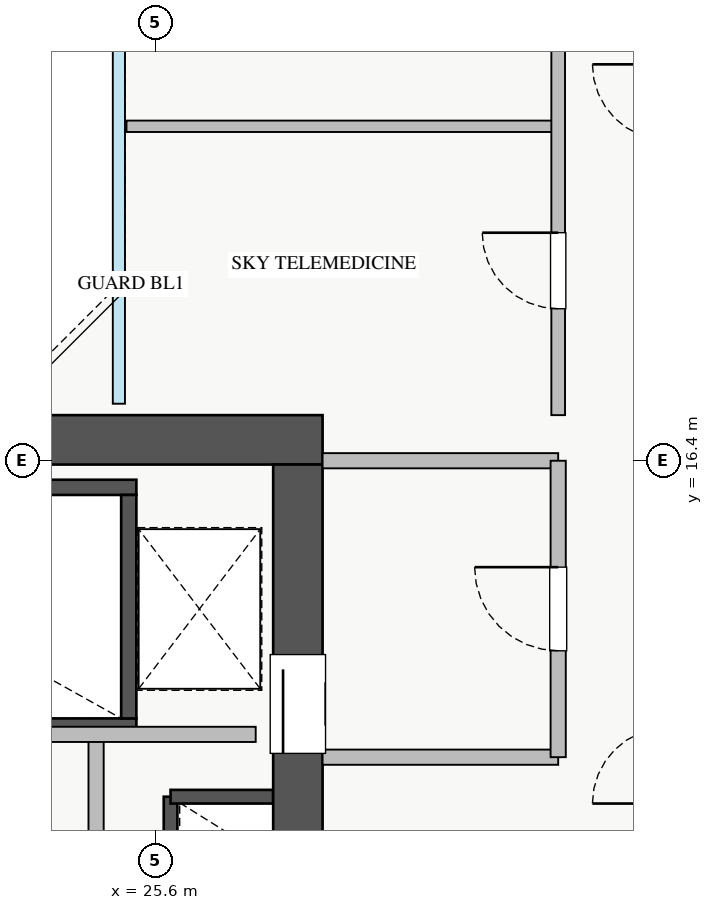
"""IFC4 building model, lengths in metres.
Left out: names, types, materials, properties, quantities, classifications, styles, units other than length and angle.
Written with IfcOpenShell. Run it as: python <this file> out.ifc"""

import sys

from ifc_helpers import new_model, si_unit, direction, frame, frame_2d, origin, place, context, subcontext, project, spatial, rectangle, extrude, source, transform, mapped, element, fill, save


model = new_model("IFC4")
c1 = context("Model", 3, precision=1e-05, world=origin(), true_north=direction((0.0, 1.0)))
c2 = subcontext(c1, "Body", "Model", "MODEL_VIEW")
j1 = project(units=[si_unit("LENGTHUNIT", "METRE"), si_unit("PLANEANGLEUNIT", "RADIAN")], contexts=[c1])
p1 = place(None, origin())
s1 = spatial("IfcSite", under=j1, at=p1, CompositionType="ELEMENT")
p2 = place(p1, origin())
s2 = spatial("IfcBuilding", under=s1, at=p2, CompositionType="ELEMENT")
p3 = place(p2, frame((0.0, 0.0, 182.75)))
s3 = spatial("IfcBuildingStorey", under=s2, at=p3, CompositionType="ELEMENT", Elevation=182.75)
p4 = place(p3, frame((25.8, 10.92, 0.0), z_axis=(0.0, 0.0, 1.0), x_axis=(0.0, 1.0, 0.0)))
e1 = element("IfcWall", 1, at=p4, inside=s3, PredefinedType="SHEAR", context=c2, shape_type="SweptSolid", body=[
    extrude(rectangle(XDim=1.06, YDim=0.18, at=frame_2d((0.53, 0.0))), origin(), (0.0, 0.0, 1.0), 3.03),
])
p5 = place(p3, frame((25.8, 11.98, 0.0), z_axis=(0.0, 0.0, 1.0), x_axis=(1.0, 0.0, 0.0)))
e2 = element("IfcWall", 2, at=p5, inside=s3, PredefinedType="SHEAR", context=c2, shape_type="SweptSolid", body=[
    extrude(rectangle(XDim=1.35, YDim=0.18, at=frame_2d((0.675, 0.0))), origin(), (0.0, 0.0, 1.0), 3.03),
])
p6 = place(p3, frame((18.2, 12.91, 0.0), z_axis=(0.0, 0.0, 1.0), x_axis=(1.0, 0.0, 0.0)))
e3 = element("IfcWall", 3, at=p6, inside=s3, PredefinedType="SHEAR", context=c2, shape_type="SweptSolid", body=[
    extrude(rectangle(XDim=7.15, YDim=0.2, at=frame_2d((3.575, 0.0))), origin(), (0.0, 0.0, 1.0), 3.25),
])
p7 = place(p6, frame((0.35, 0.0, 0.0)))
e4 = element("IfcOpeningElement", 4, at=p7, cuts=e3, PredefinedType="OPENING", context=c2, shape_type="SweptSolid", body=[
    extrude(rectangle(XDim=1.1, YDim=2.05, at=frame_2d((0.55, 1.025))), frame((0.0, 0.11, 0.0), z_axis=(0.0, -1.0, 0.0), x_axis=(1.0, 0.0, 0.0)), (0.0, 0.0, 1.0), 0.22),
])
p8 = place(p3, frame((18.2, 16.05, 0.0), z_axis=(0.0, 0.0, 1.0), x_axis=(1.0, 0.0, 0.0)))
e5 = element("IfcWall", 5, at=p8, inside=s3, PredefinedType="SHEAR", context=c2, shape_type="SweptSolid", body=[
    extrude(rectangle(XDim=7.15, YDim=0.2, at=frame_2d((3.575, 0.0))), origin(), (0.0, 0.0, 1.0), 3.25),
])
p9 = place(p3, frame((25.25, 13.01, 0.0), z_axis=(0.0, 0.0, 1.0), x_axis=(0.0, 1.0, 0.0)))
e6 = element("IfcWall", 6, at=p9, inside=s3, PredefinedType="SHEAR", context=c2, shape_type="SweptSolid", body=[
    extrude(rectangle(XDim=2.94, YDim=0.2, at=frame_2d((1.47, 0.0))), origin(), (0.0, 0.0, 1.0), 3.25),
])
p10 = place(p3, frame((10.2, 16.675, 0.0), z_axis=(0.0, 0.0, 1.0), x_axis=(1.0, 0.0, 0.0)))
e7 = element("IfcWall", 7, at=p10, inside=s3, PredefinedType="SHEAR", context=c2, shape_type="SweptSolid", body=[
    extrude(rectangle(XDim=17.6, YDim=0.65, at=frame_2d((8.8, 0.0))), origin(), (0.0, 0.0, 1.0), 3.25),
])
p11 = place(p3, frame((27.475, 10.45, 0.0), z_axis=(0.0, 0.0, 1.0), x_axis=(0.0, 1.0, 0.0)))
e8 = element("IfcWall", 8, at=p11, inside=s3, PredefinedType="SHEAR", context=c2, shape_type="SweptSolid", body=[
    extrude(rectangle(XDim=5.9, YDim=0.65, at=frame_2d((2.95, 0.0))), origin(), (0.0, 0.0, 1.0), 3.25),
])
p12 = place(p11, frame((2.1, 0.0, 0.0)))
e9 = element("IfcOpeningElement", 9, at=p12, cuts=e8, PredefinedType="OPENING", context=c2, shape_type="SweptSolid", body=[
    extrude(rectangle(XDim=1.3, YDim=2.05, at=frame_2d((0.65, 1.025))), frame((0.0, 0.335, 0.0), z_axis=(0.0, -1.0, 0.0), x_axis=(1.0, 0.0, 0.0)), (0.0, 0.0, 1.0), 0.67),
])
for number, where, z_axis, x_axis in (
    (10, (27.8, 16.4, 0.0), (0.0, 0.0, 1.0), (1.0, 0.0, 0.0)),
    (11, (27.8, 12.5, 0.0), (0.0, 0.0, 1.0), (1.0, 0.0, 0.0)),
):
    element("IfcWall", number, at=place(p3, frame(where, z_axis=z_axis, x_axis=x_axis)), inside=s3, PredefinedType="PARTITIONING", context=c2, shape_type="SweptSolid", body=[
        extrude(rectangle(XDim=3.1, YDim=0.2, at=frame_2d((1.55, 0.0))), origin(), (0.0, 0.0, 1.0), 3.03),
    ])
p13 = place(p3, frame((30.9, 12.5, 0.0), z_axis=(0.0, 0.0, 1.0), x_axis=(0.0, 1.0, 0.0)))
e12 = element("IfcWall", 12, at=p13, inside=s3, PredefinedType="PARTITIONING", context=c2, shape_type="SweptSolid", body=[
    extrude(rectangle(XDim=3.9, YDim=0.2, at=frame_2d((1.95, 0.0))), origin(), (0.0, 0.0, 1.0), 3.03),
])
p14 = place(p13, frame((1.4, 0.0, 0.0)))
e13 = element("IfcOpeningElement", 13, at=p14, cuts=e12, PredefinedType="OPENING", context=c2, shape_type="SweptSolid", body=[
    extrude(rectangle(XDim=1.1, YDim=2.05, at=frame_2d((0.55, 1.025))), frame((0.0, 0.11, 0.0), z_axis=(0.0, -1.0, 0.0), x_axis=(1.0, 0.0, 0.0)), (0.0, 0.0, 1.0), 0.22),
])
p15 = place(p3, frame((24.82, 10.15, 0.0), z_axis=(0.0, 0.0, 1.0), x_axis=(0.0, 1.0, 0.0)))
e14 = element("IfcWall", 14, at=p15, inside=s3, PredefinedType="PARTITIONING", context=c2, shape_type="SweptSolid", body=[
    extrude(rectangle(XDim=2.65, YDim=0.2, at=frame_2d((1.325, 0.0))), origin(), (0.0, 0.0, 1.0), 3.03),
])
p16 = place(p3, frame((21.75, 12.8, 0.0), z_axis=(0.0, 0.0, 1.0), x_axis=(1.0, 0.0, 0.0)))
e15 = element("IfcWall", 15, at=p16, inside=s3, PredefinedType="PARTITIONING", context=c2, shape_type="SweptSolid", body=[
    extrude(rectangle(XDim=5.17, YDim=0.2, at=frame_2d((2.585, 0.0))), origin(), (0.0, 0.0, 1.0), 3.03),
])
p17 = place(p3, frame((25.22, 20.8, 0.0), z_axis=(0.0, 0.0, 1.0), x_axis=(1.0, 0.0, 0.0)))
e16 = element("IfcWall", 16, at=p17, inside=s3, PredefinedType="PARTITIONING", context=c2, shape_type="SweptSolid", body=[
    extrude(rectangle(XDim=5.68, YDim=0.15, at=frame_2d((2.84, 0.0))), origin(), (0.0, 0.0, 1.0), 3.03),
])
p18 = place(p3, frame((30.9, 17.0, 0.0), z_axis=(0.0, 0.0, 1.0), x_axis=(0.0, 1.0, 0.0)))
e17 = element("IfcWall", 17, at=p18, inside=s3, PredefinedType="PARTITIONING", context=c2, shape_type="SweptSolid", body=[
    extrude(rectangle(XDim=12.0, YDim=0.18, at=frame_2d((6.0, 0.0))), origin(), (0.0, 0.0, 1.0), 3.03),
])
p19 = place(p18, frame((1.4, 0.0, 0.0)))
e18 = element("IfcOpeningElement", 18, at=p19, cuts=e17, PredefinedType="OPENING", context=c2, shape_type="SweptSolid", body=[
    extrude(rectangle(XDim=1.0, YDim=2.05, at=frame_2d((0.5, 1.025))), frame((0.0, 0.1, 0.0), z_axis=(0.0, -1.0, 0.0), x_axis=(1.0, 0.0, 0.0)), (0.0, 0.0, 1.0), 0.2),
])
p20 = place(p18, frame((5.4, 0.0, 0.0)))
e19 = element("IfcOpeningElement", 19, at=p20, cuts=e17, PredefinedType="OPENING", context=c2, shape_type="SweptSolid", body=[
    extrude(rectangle(XDim=1.0, YDim=2.05, at=frame_2d((0.5, 1.025))), frame((0.0, 0.1, 0.0), z_axis=(0.0, -1.0, 0.0), x_axis=(1.0, 0.0, 0.0)), (0.0, 0.0, 1.0), 0.2),
])
p21 = place(p18, frame((9.4, 0.0, 0.0)))
e20 = element("IfcOpeningElement", 20, at=p21, cuts=e17, PredefinedType="OPENING", context=c2, shape_type="SweptSolid", body=[
    extrude(rectangle(XDim=1.0, YDim=2.05, at=frame_2d((0.5, 1.025))), frame((0.0, 0.1, 0.0), z_axis=(0.0, -1.0, 0.0), x_axis=(1.0, 0.0, 0.0)), (0.0, 0.0, 1.0), 0.2),
])
m1 = source(origin(), c2, "Body", "SweptSolid", [
    extrude(rectangle(XDim=1.3, YDim=2.05, at=frame_2d((0.65, 1.025))), frame((0.0, 0.025, 0.0), z_axis=(0.0, -1.0, 0.0), x_axis=(1.0, 0.0, 0.0)), (0.0, 0.0, 1.0), 0.05),
])
p22 = place(p12, origin())
e21 = element("IfcDoor", 21, at=p22, inside=s3, OperationType="SLIDING_TO_RIGHT", PredefinedType="DOOR", context=c2, shape_type="MappedRepresentation", body=[
    mapped(m1, transform((0.0, 0.0, 0.0), x_axis=(1.0, 0.0, 0.0), y_axis=(0.0, 1.0, 0.0), z_axis=(0.0, 0.0, 1.0), scale=1.0)),
])
fill(e9, e21)
m2 = source(origin(), c2, "Body", "SweptSolid", [
    extrude(rectangle(XDim=1.1, YDim=2.05, at=frame_2d((0.55, 1.025))), frame((0.0, 0.025, 0.0), z_axis=(0.0, -1.0, 0.0), x_axis=(1.0, 0.0, 0.0)), (0.0, 0.0, 1.0), 0.05),
])
p23 = place(p14, origin())
e22 = element("IfcDoor", 22, at=p23, inside=s3, OperationType="SINGLE_SWING_RIGHT", PredefinedType="DOOR", context=c2, shape_type="MappedRepresentation", body=[
    mapped(m2, transform((0.0, 0.0, 0.0), x_axis=(1.0, 0.0, 0.0), y_axis=(0.0, 1.0, 0.0), z_axis=(0.0, 0.0, 1.0), scale=1.0)),
])
fill(e13, e22)
m3 = source(origin(), c2, "Body", "SweptSolid", [
    extrude(rectangle(XDim=1.0, YDim=2.05, at=frame_2d((0.5, 1.025))), frame((0.0, 0.025, 0.0), z_axis=(0.0, -1.0, 0.0), x_axis=(1.0, 0.0, 0.0)), (0.0, 0.0, 1.0), 0.05),
])
p24 = place(p19, origin())
e23 = element("IfcDoor", 23, at=p24, inside=s3, OperationType="SINGLE_SWING_RIGHT", PredefinedType="DOOR", context=c2, shape_type="MappedRepresentation", body=[
    mapped(m3, transform((0.0, 0.0, 0.0), x_axis=(1.0, 0.0, 0.0), y_axis=(0.0, 1.0, 0.0), z_axis=(0.0, 0.0, 1.0), scale=1.0)),
])
fill(e18, e23)
save(model, sys.argv[1])
